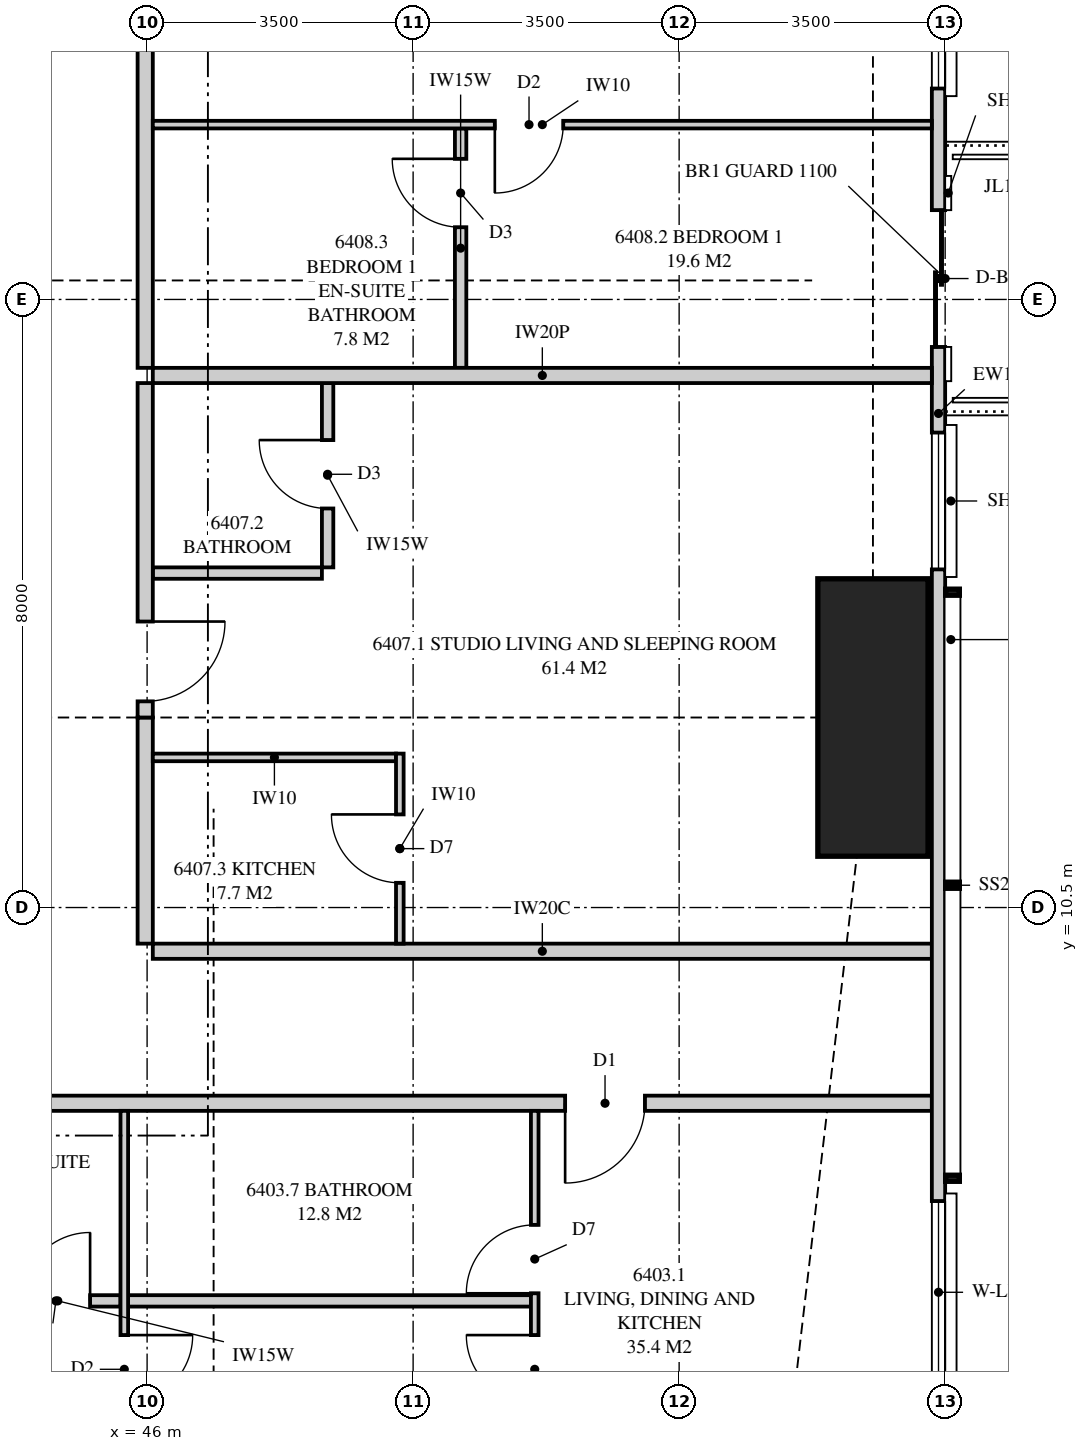
"""IFC4 building model, lengths in metres.
Left out: names, types, materials, properties, quantities, classifications, styles, units other than length and angle.
Written with IfcOpenShell. Run it as: python <this file> out.ifc"""

import sys

from ifc_helpers import new_model, si_unit, direction, frame, frame_2d, origin, origin_2d, place, context, subcontext, project, spatial, polyline, rectangle, outline, extrude, element, fill, save


model = new_model("IFC4")
c1 = context("Model", 3, precision=1e-05, world=origin(), true_north=direction((0.0, 1.0)))
c2 = subcontext(c1, "Body", "Model", "MODEL_VIEW")
j1 = project(units=[si_unit("LENGTHUNIT", "METRE"), si_unit("PLANEANGLEUNIT", "RADIAN")], contexts=[c1])
p1 = place(None, origin())
s1 = spatial("IfcSite", under=j1, at=p1, CompositionType="ELEMENT")
p2 = place(p1, origin())
s2 = spatial("IfcBuilding", under=s1, at=p2, CompositionType="ELEMENT")
p3 = place(p2, frame((0.0, 0.0, 235.45)))
s3 = spatial("IfcBuildingStorey", under=s2, at=p3, CompositionType="ELEMENT", Elevation=235.45)
p4 = place(p3, frame((55.55, 13.0, 0.0), z_axis=(0.0, 0.0, 1.0), x_axis=(1.0, 0.0, 0.0)))
e1 = element("IfcColumn", 1, at=p4, inside=s3, PredefinedType="COLUMN", context=c2, shape_type="SweptSolid", body=[
    extrude(rectangle(XDim=1.45, YDim=3.65, at=origin_2d()), origin(), (0.0, 0.0, 1.0), 3.5),
])
p5 = place(p3, frame((56.413, 3.051, 0.0), z_axis=(0.0, 0.0, 1.0), x_axis=(0.0, 1.0, 0.0)))
e2 = element("IfcWall", 2, at=p5, inside=s3, PredefinedType="SOLIDWALL", context=c2, shape_type="SweptSolid", body=[
    extrude(outline(polyline([(0.0, 0.0), (27.897, 0.0), (27.897, 3.26), (22.157, 3.26), (22.157, 2.3), (22.092, 2.3), (22.092, 3.26), (21.949, 3.26), (21.949, 2.3), (9.949, 2.3), (9.949, 3.26), (9.858, 3.26), (9.858, 2.3), (9.688, 2.3), (9.688, 3.26), (0.0, 3.26), (0.0, 0.0)])), frame((0.0, 0.087, 0.0), z_axis=(0.0, -1.0, 0.0), x_axis=(1.0, 0.0, 0.0)), (0.0, 0.0, 1.0), 0.175),
])
p6 = place(p5, frame((1.187, 0.0, 0.4)))
e3 = element("IfcOpeningElement", 3, at=p6, cuts=e2, PredefinedType="OPENING", context=c2, shape_type="SweptSolid", body=[
    extrude(rectangle(XDim=2.4, YDim=1.85, at=frame_2d((1.2, 0.925))), frame((0.0, 0.097, 0.0), z_axis=(0.0, -1.0, 0.0), x_axis=(1.0, 0.0, 0.0)), (0.0, 0.0, 1.0), 0.195),
])
p7 = place(p5, frame((11.897, 0.0, 0.4)))
e4 = element("IfcOpeningElement", 4, at=p7, cuts=e2, PredefinedType="OPENING", context=c2, shape_type="SweptSolid", body=[
    extrude(rectangle(XDim=1.8, YDim=1.85, at=frame_2d((0.9, 0.925))), frame((0.0, 0.097, 0.0), z_axis=(0.0, -1.0, 0.0), x_axis=(1.0, 0.0, 0.0)), (0.0, 0.0, 1.0), 0.195),
])
p8 = place(p5, frame((14.824, 0.0, 0.0)))
e5 = element("IfcOpeningElement", 5, at=p8, cuts=e2, PredefinedType="OPENING", context=c2, shape_type="SweptSolid", body=[
    extrude(rectangle(XDim=1.8, YDim=2.25, at=frame_2d((0.9, 1.125))), frame((0.0, 0.097, 0.0), z_axis=(0.0, -1.0, 0.0), x_axis=(1.0, 0.0, 0.0)), (0.0, 0.0, 1.0), 0.195),
])
p9 = place(p5, frame((18.224, 0.0, 0.4)))
e6 = element("IfcOpeningElement", 6, at=p9, cuts=e2, PredefinedType="OPENING", context=c2, shape_type="SweptSolid", body=[
    extrude(rectangle(XDim=1.8, YDim=1.85, at=frame_2d((0.9, 0.925))), frame((0.0, 0.097, 0.0), z_axis=(0.0, -1.0, 0.0), x_axis=(1.0, 0.0, 0.0)), (0.0, 0.0, 1.0), 0.195),
])
p10 = place(p3, frame((46.075, 9.925, 0.0), z_axis=(0.0, 0.0, 1.0), x_axis=(1.0, 0.0, 0.0)))
e7 = element("IfcWall", 7, at=p10, inside=s3, PredefinedType="PARTITIONING", context=c2, shape_type="SweptSolid", body=[
    extrude(outline(polyline([(0.0, 0.0), (10.25, 0.0), (10.25, 3.26), (10.033, 3.26), (10.033, 2.3), (8.201, 2.3), (8.201, 3.26), (2.11, 3.26), (2.11, 2.66), (0.0, 2.66), (0.0, 3.26), (0.0, 0.0)])), frame((0.0, 0.1, 0.0), z_axis=(0.0, -1.0, 0.0), x_axis=(1.0, 0.0, 0.0)), (0.0, 0.0, 1.0), 0.2),
])
p11 = place(p3, frame((38.6, 7.925, 0.0), z_axis=(0.0, 0.0, 1.0), x_axis=(1.0, 0.0, 0.0)))
e8 = element("IfcWall", 8, at=p11, inside=s3, PredefinedType="PARTITIONING", context=c2, shape_type="SweptSolid", body=[
    extrude(outline(polyline([(0.0, 0.0), (17.725, 0.0), (17.725, 3.26), (17.275, 3.26), (17.275, 2.3), (15.443, 2.3), (15.443, 3.26), (9.585, 3.26), (9.585, 2.66), (6.965, 2.66), (6.965, 3.26), (0.0, 3.26), (0.0, 0.0)])), frame((0.0, 0.1, 0.0), z_axis=(0.0, -1.0, 0.0), x_axis=(1.0, 0.0, 0.0)), (0.0, 0.0, 1.0), 0.2),
])
p12 = place(p11, frame((12.9, 0.0, 0.0)))
e9 = element("IfcOpeningElement", 9, at=p12, cuts=e8, PredefinedType="OPENING", context=c2, shape_type="SweptSolid", body=[
    extrude(rectangle(XDim=1.05, YDim=2.2, at=frame_2d((0.525, 1.1))), frame((0.0, 0.11, 0.0), z_axis=(0.0, -1.0, 0.0), x_axis=(1.0, 0.0, 0.0)), (0.0, 0.0, 1.0), 0.22),
])
p13 = place(p3, frame((45.7, 0.175, 0.0), z_axis=(0.0, 0.0, 1.0), x_axis=(0.0, 1.0, 0.0)))
e10 = element("IfcWall", 10, at=p13, inside=s3, PredefinedType="PARTITIONING", context=c2, shape_type="SweptSolid", body=[
    extrude(outline(polyline([(0.529, 2.3), (0.0, 2.3), (0.0, 0.0), (0.529, 0.0), (0.529, 0.31), (1.021, 0.31), (1.021, 0.0), (7.65, 0.0), (7.65, 2.66), (1.635, 2.66), (1.635, 2.3), (1.021, 2.3), (1.021, 1.99), (0.529, 1.99), (0.529, 2.3)])), frame((0.0, 0.05, 0.0), z_axis=(0.0, -1.0, 0.0), x_axis=(1.0, 0.0, 0.0)), (0.0, 0.0, 1.0), 0.1),
])
p14 = place(p13, frame((3.8, 0.0, 0.0)))
e11 = element("IfcOpeningElement", 11, at=p14, cuts=e10, PredefinedType="OPENING", context=c2, shape_type="SweptSolid", body=[
    extrude(rectangle(XDim=0.9, YDim=2.1, at=frame_2d((0.45, 1.05))), frame((0.0, 0.06, 0.0), z_axis=(0.0, -1.0, 0.0), x_axis=(1.0, 0.0, 0.0)), (0.0, 0.0, 1.0), 0.12),
])
p15 = place(p3, frame((51.1, 0.175, 0.0), z_axis=(0.0, 0.0, 1.0), x_axis=(0.0, 1.0, 0.0)))
e12 = element("IfcWall", 12, at=p15, inside=s3, PredefinedType="PARTITIONING", context=c2, shape_type="SweptSolid", body=[
    extrude(outline(polyline([(0.0, 0.0), (7.65, 0.0), (7.65, 3.26), (2.363, 3.26), (2.363, 2.3), (0.619, 2.3), (0.619, 3.26), (0.0, 3.26), (0.0, 0.0)])), frame((0.0, 0.05, 0.0), z_axis=(0.0, -1.0, 0.0), x_axis=(1.0, 0.0, 0.0)), (0.0, 0.0, 1.0), 0.1),
])
p16 = place(p15, frame((3.8, 0.0, 0.0)))
e13 = element("IfcOpeningElement", 13, at=p16, cuts=e12, PredefinedType="OPENING", context=c2, shape_type="SweptSolid", body=[
    extrude(rectangle(XDim=0.9, YDim=2.1, at=frame_2d((0.45, 1.05))), frame((0.0, 0.06, 0.0), z_axis=(0.0, -1.0, 0.0), x_axis=(1.0, 0.0, 0.0)), (0.0, 0.0, 1.0), 0.12),
])
p17 = place(p15, frame((5.25, 0.0, 0.0)))
e14 = element("IfcOpeningElement", 14, at=p17, cuts=e12, PredefinedType="OPENING", context=c2, shape_type="SweptSolid", body=[
    extrude(rectangle(XDim=0.9, YDim=2.1, at=frame_2d((0.45, 1.05))), frame((0.0, 0.06, 0.0), z_axis=(0.0, -1.0, 0.0), x_axis=(1.0, 0.0, 0.0)), (0.0, 0.0, 1.0), 0.12),
])
p18 = place(p3, frame((42.15, 5.325, 0.0), z_axis=(0.0, 0.0, 1.0), x_axis=(1.0, 0.0, 0.0)))
e15 = element("IfcWall", 15, at=p18, inside=s3, PredefinedType="PLUMBINGWALL", context=c2, shape_type="SweptSolid", body=[
    extrude(outline(polyline([(0.0, 0.0), (3.5, 0.0), (3.5, 3.26), (3.5, 2.66), (3.44, 2.66), (3.44, 3.26), (0.0, 3.26), (0.0, 0.0)])), frame((0.0, 0.075, 0.0), z_axis=(0.0, -1.0, 0.0), x_axis=(1.0, 0.0, 0.0)), (0.0, 0.0, 1.0), 0.15),
])
p19 = place(p18, frame((2.2, 0.0, 0.0)))
e16 = element("IfcOpeningElement", 16, at=p19, cuts=e15, PredefinedType="OPENING", context=c2, shape_type="SweptSolid", body=[
    extrude(rectangle(XDim=0.9, YDim=2.1, at=frame_2d((0.45, 1.05))), frame((0.0, 0.085, 0.0), z_axis=(0.0, -1.0, 0.0), x_axis=(1.0, 0.0, 0.0)), (0.0, 0.0, 1.0), 0.17),
])
p20 = place(p3, frame((45.75, 5.325, 0.0), z_axis=(0.0, 0.0, 1.0), x_axis=(1.0, 0.0, 0.0)))
e17 = element("IfcWall", 17, at=p20, inside=s3, PredefinedType="PLUMBINGWALL", context=c2, shape_type="SweptSolid", body=[
    extrude(outline(polyline([(0.0, 0.0), (5.3, 0.0), (5.3, 3.26), (2.41, 3.26), (2.41, 2.66), (0.0, 2.66), (0.0, 3.26), (0.0, 0.0)])), frame((0.0, 0.075, 0.0), z_axis=(0.0, -1.0, 0.0), x_axis=(1.0, 0.0, 0.0)), (0.0, 0.0, 1.0), 0.15),
])
p21 = place(p3, frame((56.325, 17.5, 0.0), z_axis=(0.0, 0.0, 1.0), x_axis=(-1.0, 0.0, 0.0)))
e18 = element("IfcWall", 18, at=p21, inside=s3, PredefinedType="PARTITIONING", context=c2, shape_type="SweptSolid", body=[
    extrude(outline(polyline([(0.0, 0.0), (10.25, 0.0), (10.25, 3.26), (10.25, 2.66), (1.685, 2.66), (1.685, 2.3), (0.0, 2.3), (0.0, 3.26), (0.0, 0.0)])), frame((0.0, 0.1, 0.0), z_axis=(0.0, -1.0, 0.0), x_axis=(1.0, 0.0, 0.0)), (0.0, 0.0, 1.0), 0.2),
])
p22 = place(p3, frame((45.975, 10.025, 0.0), z_axis=(0.0, 0.0, 1.0), x_axis=(0.0, 1.0, 0.0)))
e19 = element("IfcWall", 19, at=p22, inside=s3, PredefinedType="PARTITIONING", context=c2, shape_type="SweptSolid", body=[
    extrude(rectangle(XDim=2.975, YDim=0.2, at=frame_2d((1.488, 0.0))), origin(), (0.0, 0.0, 1.0), 2.66),
])
p23 = place(p3, frame((45.975, 13.0, 0.0), z_axis=(0.0, 0.0, 1.0), x_axis=(0.0, 1.0, 0.0)))
e20 = element("IfcWall", 20, at=p23, inside=s3, PredefinedType="PARTITIONING", context=c2, shape_type="SweptSolid", body=[
    extrude(outline(polyline([(0.0, 0.0), (4.4, 0.0), (4.4, 3.26), (1.31, 3.26), (1.31, 2.66), (0.0, 2.66), (0.0, 0.0)])), frame((0.0, 0.1, 0.0), z_axis=(0.0, -1.0, 0.0), x_axis=(1.0, 0.0, 0.0)), (0.0, 0.0, 1.0), 0.2),
])
p24 = place(p23, frame((0.212, 0.0, 0.0)))
e21 = element("IfcOpeningElement", 21, at=p24, cuts=e20, PredefinedType="OPENING", context=c2, shape_type="SweptSolid", body=[
    extrude(rectangle(XDim=1.05, YDim=2.2, at=frame_2d((0.525, 1.1))), frame((0.0, 0.11, 0.0), z_axis=(0.0, -1.0, 0.0), x_axis=(1.0, 0.0, 0.0)), (0.0, 0.0, 1.0), 0.22),
])
p25 = place(p3, frame((48.375, 14.975, 0.0), z_axis=(0.0, 0.0, 1.0), x_axis=(0.0, 1.0, 0.0)))
e22 = element("IfcWall", 22, at=p25, inside=s3, PredefinedType="PLUMBINGWALL", context=c2, shape_type="SweptSolid", body=[
    extrude(rectangle(XDim=2.425, YDim=0.15, at=frame_2d((1.212, 0.0))), origin(), (0.0, 0.0, 1.0), 3.26),
])
p26 = place(p25, frame((0.775, 0.0, 0.0)))
e23 = element("IfcOpeningElement", 23, at=p26, cuts=e22, PredefinedType="OPENING", context=c2, shape_type="SweptSolid", body=[
    extrude(rectangle(XDim=0.9, YDim=2.1, at=frame_2d((0.45, 1.05))), frame((0.0, 0.085, 0.0), z_axis=(0.0, -1.0, 0.0), x_axis=(1.0, 0.0, 0.0)), (0.0, 0.0, 1.0), 0.17),
])
p27 = place(p3, frame((48.3, 14.9, 0.0), z_axis=(0.0, 0.0, 1.0), x_axis=(-1.0, 0.0, 0.0)))
e24 = element("IfcWall", 24, at=p27, inside=s3, PredefinedType="PLUMBINGWALL", context=c2, shape_type="SweptSolid", body=[
    extrude(rectangle(XDim=2.225, YDim=0.15, at=frame_2d((1.113, 0.0))), origin(), (0.0, 0.0, 1.0), 3.26),
])
p28 = place(p3, frame((45.975, 17.6, 0.0), z_axis=(0.0, 0.0, 1.0), x_axis=(0.0, 1.0, 0.0)))
e25 = element("IfcWall", 25, at=p28, inside=s3, PredefinedType="PARTITIONING", context=c2, shape_type="SweptSolid", body=[
    extrude(outline(polyline([(0.0, 0.0), (7.4, 0.0), (7.4, 2.66), (6.09, 2.66), (6.09, 3.26), (2.46, 3.26), (2.46, 2.66), (0.0, 2.66), (0.0, 0.0)])), frame((0.0, 0.1, 0.0), z_axis=(0.0, -1.0, 0.0), x_axis=(1.0, 0.0, 0.0)), (0.0, 0.0, 1.0), 0.2),
])
p29 = place(p28, frame((4.188, 0.0, 0.0)))
e26 = element("IfcOpeningElement", 26, at=p29, cuts=e25, PredefinedType="OPENING", context=c2, shape_type="SweptSolid", body=[
    extrude(rectangle(XDim=1.05, YDim=2.2, at=frame_2d((0.525, 1.1))), frame((0.0, 0.11, 0.0), z_axis=(0.0, -1.0, 0.0), x_axis=(1.0, 0.0, 0.0)), (0.0, 0.0, 1.0), 0.22),
])
p30 = place(p3, frame((56.325, 20.8, 0.0), z_axis=(0.0, 0.0, 1.0), x_axis=(-1.0, 0.0, 0.0)))
e27 = element("IfcWall", 27, at=p30, inside=s3, PredefinedType="PARTITIONING", context=c2, shape_type="SweptSolid", body=[
    extrude(outline(polyline([(0.0, 0.0), (10.25, 0.0), (10.25, 3.26), (1.635, 3.26), (1.635, 2.3), (0.0, 2.3), (0.0, 3.26), (0.0, 0.0)])), frame((0.0, 0.05, 0.0), z_axis=(0.0, -1.0, 0.0), x_axis=(1.0, 0.0, 0.0)), (0.0, 0.0, 1.0), 0.1),
])
p31 = place(p30, frame((4.85, 0.0, 0.0)))
e28 = element("IfcOpeningElement", 28, at=p31, cuts=e27, PredefinedType="OPENING", context=c2, shape_type="SweptSolid", body=[
    extrude(rectangle(XDim=0.9, YDim=2.1, at=frame_2d((0.45, 1.05))), frame((0.0, 0.06, 0.0), z_axis=(0.0, -1.0, 0.0), x_axis=(1.0, 0.0, 0.0)), (0.0, 0.0, 1.0), 0.12),
])
p32 = place(p3, frame((50.125, 17.6, 0.0), z_axis=(0.0, 0.0, 1.0), x_axis=(0.0, 1.0, 0.0)))
e29 = element("IfcWall", 29, at=p32, inside=s3, PredefinedType="PLUMBINGWALL", context=c2, shape_type="SweptSolid", body=[
    extrude(outline(polyline([(0.0, 0.0), (3.15, 0.0), (3.15, 3.26), (2.435, 3.26), (2.435, 2.66), (0.0, 2.66), (0.0, 3.26), (0.0, 0.0)])), frame((0.0, 0.075, 0.0), z_axis=(0.0, -1.0, 0.0), x_axis=(1.0, 0.0, 0.0)), (0.0, 0.0, 1.0), 0.15),
])
p33 = place(p32, frame((1.85, 0.0, 0.0)))
e30 = element("IfcOpeningElement", 30, at=p33, cuts=e29, PredefinedType="OPENING", context=c2, shape_type="SweptSolid", body=[
    extrude(rectangle(XDim=0.9, YDim=2.1, at=frame_2d((0.45, 1.05))), frame((0.0, 0.085, 0.0), z_axis=(0.0, -1.0, 0.0), x_axis=(1.0, 0.0, 0.0)), (0.0, 0.0, 1.0), 0.17),
])
p34 = place(p3, frame((49.325, 10.025, 0.0), z_axis=(0.0, 0.0, 1.0), x_axis=(0.0, 1.0, 0.0)))
e31 = element("IfcWall", 31, at=p34, inside=s3, PredefinedType="PARTITIONING", context=c2, shape_type="SweptSolid", body=[
    extrude(outline(polyline([(0.0, 0.0), (2.5, 0.0), (2.5, 3.26), (2.5, 2.66), (1.715, 2.66), (1.715, 3.26), (0.0, 3.26), (0.0, 0.0)])), frame((0.0, 0.05, 0.0), z_axis=(0.0, -1.0, 0.0), x_axis=(1.0, 0.0, 0.0)), (0.0, 0.0, 1.0), 0.1),
])
p35 = place(p34, frame((0.8, 0.0, 0.0)))
e32 = element("IfcOpeningElement", 32, at=p35, cuts=e31, PredefinedType="OPENING", context=c2, shape_type="SweptSolid", body=[
    extrude(rectangle(XDim=0.9, YDim=2.1, at=frame_2d((0.45, 1.05))), frame((0.0, 0.06, 0.0), z_axis=(0.0, -1.0, 0.0), x_axis=(1.0, 0.0, 0.0)), (0.0, 0.0, 1.0), 0.12),
])
p36 = place(p3, frame((46.075, 12.475, 0.0), z_axis=(0.0, 0.0, 1.0), x_axis=(1.0, 0.0, 0.0)))
e33 = element("IfcWall", 33, at=p36, inside=s3, PredefinedType="PARTITIONING", context=c2, shape_type="SweptSolid", body=[
    extrude(outline(polyline([(0.0, 0.0), (3.2, 0.0), (3.2, 3.26), (3.2, 2.66), (2.06, 2.66), (0.0, 2.66), (0.0, 3.26), (0.0, 0.0)])), frame((0.0, 0.05, 0.0), z_axis=(0.0, -1.0, 0.0), x_axis=(1.0, 0.0, 0.0)), (0.0, 0.0, 1.0), 0.1),
])
p37 = place(p6, origin())
e34 = element("IfcWindow", 34, at=p37, inside=s3, PartitioningType="SINGLE_PANEL", PredefinedType="WINDOW", context=c2, shape_type="SweptSolid", body=[
    extrude(rectangle(XDim=2.4, YDim=1.85, at=frame_2d((1.2, 0.925))), frame((0.0, 0.03, 0.0), z_axis=(0.0, -1.0, 0.0), x_axis=(1.0, 0.0, 0.0)), (0.0, 0.0, 1.0), 0.06),
])
fill(e3, e34)
p38 = place(p7, origin())
e35 = element("IfcWindow", 35, at=p38, inside=s3, PartitioningType="SINGLE_PANEL", PredefinedType="WINDOW", context=c2, shape_type="SweptSolid", body=[
    extrude(rectangle(XDim=1.8, YDim=1.85, at=frame_2d((0.9, 0.925))), frame((0.0, 0.03, 0.0), z_axis=(0.0, -1.0, 0.0), x_axis=(1.0, 0.0, 0.0)), (0.0, 0.0, 1.0), 0.06),
])
fill(e4, e35)
p39 = place(p8, origin())
e36 = element("IfcDoor", 36, at=p39, inside=s3, OperationType="SLIDING_TO_LEFT", PredefinedType="DOOR", context=c2, shape_type="SweptSolid", body=[
    extrude(rectangle(XDim=1.8, YDim=2.25, at=frame_2d((0.9, 1.125))), frame((0.0, 0.025, 0.0), z_axis=(0.0, -1.0, 0.0), x_axis=(1.0, 0.0, 0.0)), (0.0, 0.0, 1.0), 0.05),
])
fill(e5, e36)
p40 = place(p9, origin())
e37 = element("IfcWindow", 37, at=p40, inside=s3, PartitioningType="SINGLE_PANEL", PredefinedType="WINDOW", context=c2, shape_type="SweptSolid", body=[
    extrude(rectangle(XDim=1.8, YDim=1.85, at=frame_2d((0.9, 0.925))), frame((0.0, 0.03, 0.0), z_axis=(0.0, -1.0, 0.0), x_axis=(1.0, 0.0, 0.0)), (0.0, 0.0, 1.0), 0.06),
])
fill(e6, e37)
p41 = place(p12, frame((1.05, 0.0, 0.0), z_axis=(0.0, 0.0, 1.0), x_axis=(-1.0, 0.0, 0.0)))
e38 = element("IfcDoor", 38, at=p41, inside=s3, OperationType="SINGLE_SWING_RIGHT", PredefinedType="DOOR", context=c2, shape_type="SweptSolid", body=[
    extrude(rectangle(XDim=1.05, YDim=2.2, at=frame_2d((0.525, 1.1))), frame((0.0, 0.025, 0.0), z_axis=(0.0, -1.0, 0.0), x_axis=(1.0, 0.0, 0.0)), (0.0, 0.0, 1.0), 0.05),
])
fill(e9, e38)
p42 = place(p14, frame((0.9, 0.0, 0.0), z_axis=(0.0, 0.0, 1.0), x_axis=(-1.0, 0.0, 0.0)))
e39 = element("IfcDoor", 39, at=p42, inside=s3, OperationType="SINGLE_SWING_LEFT", PredefinedType="DOOR", context=c2, shape_type="SweptSolid", body=[
    extrude(rectangle(XDim=0.9, YDim=2.1, at=frame_2d((0.45, 1.05))), frame((0.0, 0.025, 0.0), z_axis=(0.0, -1.0, 0.0), x_axis=(1.0, 0.0, 0.0)), (0.0, 0.0, 1.0), 0.05),
])
fill(e11, e39)
p43 = place(p19, origin())
e40 = element("IfcDoor", 40, at=p43, inside=s3, OperationType="SINGLE_SWING_RIGHT", PredefinedType="DOOR", context=c2, shape_type="SweptSolid", body=[
    extrude(rectangle(XDim=0.9, YDim=2.1, at=frame_2d((0.45, 1.05))), frame((0.0, 0.025, 0.0), z_axis=(0.0, -1.0, 0.0), x_axis=(1.0, 0.0, 0.0)), (0.0, 0.0, 1.0), 0.05),
])
fill(e16, e40)
p44 = place(p16, origin())
e41 = element("IfcDoor", 41, at=p44, inside=s3, OperationType="SINGLE_SWING_RIGHT", PredefinedType="DOOR", context=c2, shape_type="SweptSolid", body=[
    extrude(rectangle(XDim=0.9, YDim=2.1, at=frame_2d((0.45, 1.05))), frame((0.0, 0.025, 0.0), z_axis=(0.0, -1.0, 0.0), x_axis=(1.0, 0.0, 0.0)), (0.0, 0.0, 1.0), 0.05),
])
fill(e13, e41)
p45 = place(p17, origin())
e42 = element("IfcDoor", 42, at=p45, inside=s3, OperationType="SINGLE_SWING_LEFT", PredefinedType="DOOR", context=c2, shape_type="SweptSolid", body=[
    extrude(rectangle(XDim=0.9, YDim=2.1, at=frame_2d((0.45, 1.05))), frame((0.0, 0.025, 0.0), z_axis=(0.0, -1.0, 0.0), x_axis=(1.0, 0.0, 0.0)), (0.0, 0.0, 1.0), 0.05),
])
fill(e14, e42)
p46 = place(p24, frame((1.05, 0.0, 0.0), z_axis=(0.0, 0.0, 1.0), x_axis=(-1.0, 0.0, 0.0)))
e43 = element("IfcDoor", 43, at=p46, inside=s3, OperationType="SINGLE_SWING_LEFT", PredefinedType="DOOR", context=c2, shape_type="SweptSolid", body=[
    extrude(rectangle(XDim=1.05, YDim=2.2, at=frame_2d((0.525, 1.1))), frame((0.0, 0.025, 0.0), z_axis=(0.0, -1.0, 0.0), x_axis=(1.0, 0.0, 0.0)), (0.0, 0.0, 1.0), 0.05),
])
fill(e21, e43)
p47 = place(p26, origin())
e44 = element("IfcDoor", 44, at=p47, inside=s3, OperationType="SINGLE_SWING_RIGHT", PredefinedType="DOOR", context=c2, shape_type="SweptSolid", body=[
    extrude(rectangle(XDim=0.9, YDim=2.1, at=frame_2d((0.45, 1.05))), frame((0.0, 0.025, 0.0), z_axis=(0.0, -1.0, 0.0), x_axis=(1.0, 0.0, 0.0)), (0.0, 0.0, 1.0), 0.05),
])
fill(e23, e44)
p48 = place(p31, origin())
e45 = element("IfcDoor", 45, at=p48, inside=s3, OperationType="SINGLE_SWING_RIGHT", PredefinedType="DOOR", context=c2, shape_type="SweptSolid", body=[
    extrude(rectangle(XDim=0.9, YDim=2.1, at=frame_2d((0.45, 1.05))), frame((0.0, 0.025, 0.0), z_axis=(0.0, -1.0, 0.0), x_axis=(1.0, 0.0, 0.0)), (0.0, 0.0, 1.0), 0.05),
])
fill(e28, e45)
p49 = place(p33, origin())
e46 = element("IfcDoor", 46, at=p49, inside=s3, OperationType="SINGLE_SWING_RIGHT", PredefinedType="DOOR", context=c2, shape_type="SweptSolid", body=[
    extrude(rectangle(XDim=0.9, YDim=2.1, at=frame_2d((0.45, 1.05))), frame((0.0, 0.025, 0.0), z_axis=(0.0, -1.0, 0.0), x_axis=(1.0, 0.0, 0.0)), (0.0, 0.0, 1.0), 0.05),
])
fill(e30, e46)
p50 = place(p35, origin())
e47 = element("IfcDoor", 47, at=p50, inside=s3, OperationType="SINGLE_SWING_RIGHT", PredefinedType="DOOR", context=c2, shape_type="SweptSolid", body=[
    extrude(rectangle(XDim=0.9, YDim=2.1, at=frame_2d((0.45, 1.05))), frame((0.0, 0.025, 0.0), z_axis=(0.0, -1.0, 0.0), x_axis=(1.0, 0.0, 0.0)), (0.0, 0.0, 1.0), 0.05),
])
fill(e32, e47)
save(model, sys.argv[1])
